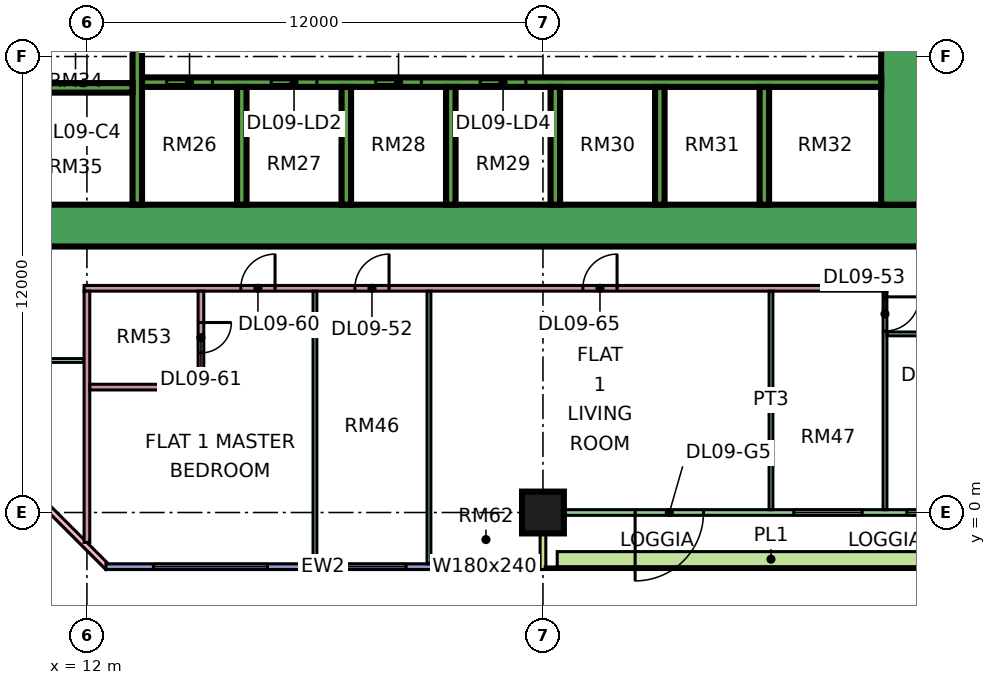
"""IFC4 building model, lengths in metres.
Left out: names, types, materials, properties, quantities, classifications, styles, units other than length and angle.
Written with IfcOpenShell. Run it as: python <this file> out.ifc"""

import sys

from ifc_helpers import new_model, si_unit, direction, frame, frame_2d, origin, origin_2d, place, context, subcontext, project, spatial, rectangle, extrude, element, fill, save


model = new_model("IFC4")
c1 = context("Model", 3, precision=1e-05, world=origin(), true_north=direction((0.0, 1.0)))
c2 = subcontext(c1, "Body", "Model", "MODEL_VIEW")
j1 = project(units=[si_unit("LENGTHUNIT", "METRE"), si_unit("PLANEANGLEUNIT", "RADIAN")], contexts=[c1])
p1 = place(None, origin())
s1 = spatial("IfcSite", under=j1, at=p1, CompositionType="ELEMENT")
p2 = place(p1, origin())
s2 = spatial("IfcBuilding", under=s1, at=p2, CompositionType="ELEMENT")
p3 = place(p2, frame((0.0, 0.0, 48.9)))
s3 = spatial("IfcBuildingStorey", under=s2, at=p3, CompositionType="ELEMENT", Elevation=48.9)
p4 = place(p3, frame((24.0, 0.0, 0.0), z_axis=(0.0, 0.0, 1.0), x_axis=(1.0, 0.0, 0.0)))
e1 = element("IfcColumn", 1, at=p4, inside=s3, PredefinedType="COLUMN", context=c2, shape_type="SweptSolid", body=[
    extrude(rectangle(XDim=1.1, YDim=1.1, at=origin_2d()), origin(), (0.0, 0.0, 1.0), 3.75),
])
p5 = place(p3, frame((9.0, 7.55, 0.0), z_axis=(0.0, 0.0, 1.0), x_axis=(1.0, 0.0, 0.0)))
e2 = element("IfcWall", 2, at=p5, inside=s3, PredefinedType="SHEAR", context=c2, shape_type="SweptSolid", body=[
    extrude(rectangle(XDim=25.0, YDim=1.1, at=frame_2d((12.5, 0.0))), origin(), (0.0, 0.0, 1.0), 3.75),
])
p6 = place(p3, frame((33.45, 8.1, 0.0), z_axis=(0.0, 0.0, 1.0), x_axis=(0.0, 1.0, 0.0)))
e3 = element("IfcWall", 3, at=p6, inside=s3, PredefinedType="SHEAR", context=c2, shape_type="SweptSolid", body=[
    extrude(rectangle(XDim=10.8, YDim=1.1, at=frame_2d((5.4, 0.0))), origin(), (0.0, 0.0, 1.0), 3.75),
])
p7 = place(p6, frame((5.1, 0.0, 0.0)))
e4 = element("IfcOpeningElement", 4, at=p7, cuts=e3, PredefinedType="OPENING", context=c2, shape_type="SweptSolid", body=[
    extrude(rectangle(XDim=1.8, YDim=2.4, at=frame_2d((0.9, 1.2))), frame((0.0, 0.56, 0.0), z_axis=(0.0, -1.0, 0.0), x_axis=(1.0, 0.0, 0.0)), (0.0, 0.0, 1.0), 1.12),
])
p8 = place(p3, frame((13.325, 8.1, 0.0), z_axis=(0.0, 0.0, 1.0), x_axis=(0.0, 1.0, 0.0)))
e5 = element("IfcWall", 5, at=p8, inside=s3, PredefinedType="SHEAR", context=c2, shape_type="SweptSolid", body=[
    extrude(rectangle(XDim=10.8, YDim=0.25, at=frame_2d((5.4, 0.0))), origin(), (0.0, 0.0, 1.0), 3.75),
])
p9 = place(p3, frame((13.45, 11.325, 0.0), z_axis=(0.0, 0.0, 1.0), x_axis=(1.0, 0.0, 0.0)))
e6 = element("IfcWall", 6, at=p9, inside=s3, PredefinedType="SHEAR", context=c2, shape_type="SweptSolid", body=[
    extrude(rectangle(XDim=19.45, YDim=0.25, at=frame_2d((9.725, 0.0))), origin(), (0.0, 0.0, 1.0), 3.75),
])
p10 = place(p9, frame((0.65, 0.0, 0.0)))
e7 = element("IfcOpeningElement", 7, at=p10, cuts=e6, PredefinedType="OPENING", context=c2, shape_type="SweptSolid", body=[
    extrude(rectangle(XDim=1.2, YDim=2.2, at=frame_2d((0.6, 1.1))), frame((0.0, 0.135, 0.0), z_axis=(0.0, -1.0, 0.0), x_axis=(1.0, 0.0, 0.0)), (0.0, 0.0, 1.0), 0.27),
])
p11 = place(p9, frame((3.4, 0.0, 0.0)))
e8 = element("IfcOpeningElement", 8, at=p11, cuts=e6, PredefinedType="OPENING", context=c2, shape_type="SweptSolid", body=[
    extrude(rectangle(XDim=1.2, YDim=2.2, at=frame_2d((0.6, 1.1))), frame((0.0, 0.135, 0.0), z_axis=(0.0, -1.0, 0.0), x_axis=(1.0, 0.0, 0.0)), (0.0, 0.0, 1.0), 0.27),
])
p12 = place(p9, frame((6.15, 0.0, 0.0)))
e9 = element("IfcOpeningElement", 9, at=p12, cuts=e6, PredefinedType="OPENING", context=c2, shape_type="SweptSolid", body=[
    extrude(rectangle(XDim=1.2, YDim=2.2, at=frame_2d((0.6, 1.1))), frame((0.0, 0.135, 0.0), z_axis=(0.0, -1.0, 0.0), x_axis=(1.0, 0.0, 0.0)), (0.0, 0.0, 1.0), 0.27),
])
p13 = place(p9, frame((8.9, 0.0, 0.0)))
e10 = element("IfcOpeningElement", 10, at=p13, cuts=e6, PredefinedType="OPENING", context=c2, shape_type="SweptSolid", body=[
    extrude(rectangle(XDim=1.2, YDim=2.2, at=frame_2d((0.6, 1.1))), frame((0.0, 0.135, 0.0), z_axis=(0.0, -1.0, 0.0), x_axis=(1.0, 0.0, 0.0)), (0.0, 0.0, 1.0), 0.27),
])
p14 = place(p3, frame((10.2, 11.175, 0.0), z_axis=(0.0, 0.0, 1.0), x_axis=(1.0, 0.0, 0.0)))
e11 = element("IfcWall", 11, at=p14, inside=s3, PredefinedType="SHEAR", context=c2, shape_type="SweptSolid", body=[
    extrude(rectangle(XDim=3.0, YDim=0.25, at=frame_2d((1.5, 0.0))), origin(), (0.0, 0.0, 1.0), 3.75),
])
for number, where, z_axis, x_axis in (
    (12, (16.075, 8.1, 0.0), (0.0, 0.0, 1.0), (0.0, 1.0, 0.0)),
    (13, (18.825, 8.1, 0.0), (0.0, 0.0, 1.0), (0.0, 1.0, 0.0)),
    (14, (21.575, 8.1, 0.0), (0.0, 0.0, 1.0), (0.0, 1.0, 0.0)),
    (15, (24.325, 8.1, 0.0), (0.0, 0.0, 1.0), (0.0, 1.0, 0.0)),
    (16, (27.075, 8.1, 0.0), (0.0, 0.0, 1.0), (0.0, 1.0, 0.0)),
    (17, (29.825, 8.1, 0.0), (0.0, 0.0, 1.0), (0.0, 1.0, 0.0)),
):
    element("IfcWall", number, at=place(p3, frame(where, z_axis=z_axis, x_axis=x_axis)), inside=s3, PredefinedType="SHEAR", context=c2, shape_type="SweptSolid", body=[
        extrude(rectangle(XDim=3.1, YDim=0.25, at=frame_2d((1.55, 0.0))), origin(), (0.0, 0.0, 1.0), 3.75),
    ])
p15 = place(p3, frame((-1.447, 12.553, 0.0), z_axis=(0.0, 0.0, 1.0), x_axis=(0.707106781187, -0.707106781187, 0.0)))
e18 = element("IfcWall", 18, at=p15, inside=s3, PredefinedType="SOLIDWALL", context=c2, shape_type="SweptSolid", body=[
    extrude(rectangle(XDim=19.799, YDim=0.15, at=frame_2d((9.899, 0.0))), origin(), (0.0, 0.0, 1.0), 3.35),
])
p16 = place(p15, frame((2.212, 0.0, 0.45)))
e19 = element("IfcOpeningElement", 19, at=p16, cuts=e18, PredefinedType="OPENING", context=c2, shape_type="SweptSolid", body=[
    extrude(rectangle(XDim=3.0, YDim=2.4, at=frame_2d((1.5, 1.2))), frame((0.0, 0.085, 0.0), z_axis=(0.0, -1.0, 0.0), x_axis=(1.0, 0.0, 0.0)), (0.0, 0.0, 1.0), 0.17),
])
p17 = place(p15, frame((10.216, 0.0, 0.45)))
e20 = element("IfcOpeningElement", 20, at=p17, cuts=e18, PredefinedType="OPENING", context=c2, shape_type="SweptSolid", body=[
    extrude(rectangle(XDim=3.0, YDim=2.4, at=frame_2d((1.5, 1.2))), frame((0.0, 0.085, 0.0), z_axis=(0.0, -1.0, 0.0), x_axis=(1.0, 0.0, 0.0)), (0.0, 0.0, 1.0), 0.17),
])
p18 = place(p3, frame((12.5, -1.425, 0.0), z_axis=(0.0, 0.0, 1.0), x_axis=(1.0, 0.0, 0.0)))
e21 = element("IfcWall", 21, at=p18, inside=s3, PredefinedType="SOLIDWALL", context=c2, shape_type="SweptSolid", body=[
    extrude(rectangle(XDim=11.425, YDim=0.15, at=frame_2d((5.712, 0.0))), origin(), (0.0, 0.0, 1.0), 3.35),
])
p19 = place(p18, frame((1.25, 0.0, 0.45)))
e22 = element("IfcOpeningElement", 22, at=p19, cuts=e21, PredefinedType="OPENING", context=c2, shape_type="SweptSolid", body=[
    extrude(rectangle(XDim=3.0, YDim=2.4, at=frame_2d((1.5, 1.2))), frame((0.0, 0.085, 0.0), z_axis=(0.0, -1.0, 0.0), x_axis=(1.0, 0.0, 0.0)), (0.0, 0.0, 1.0), 0.17),
])
p20 = place(p18, frame((6.1, 0.0, 0.45)))
e23 = element("IfcOpeningElement", 23, at=p20, cuts=e21, PredefinedType="OPENING", context=c2, shape_type="SweptSolid", body=[
    extrude(rectangle(XDim=1.8, YDim=2.4, at=frame_2d((0.9, 1.2))), frame((0.0, 0.085, 0.0), z_axis=(0.0, -1.0, 0.0), x_axis=(1.0, 0.0, 0.0)), (0.0, 0.0, 1.0), 0.17),
])
p21 = place(p18, frame((9.062, 0.0, 0.45)))
e24 = element("IfcOpeningElement", 24, at=p21, cuts=e21, PredefinedType="OPENING", context=c2, shape_type="SweptSolid", body=[
    extrude(rectangle(XDim=1.8, YDim=2.4, at=frame_2d((0.9, 1.2))), frame((0.0, 0.085, 0.0), z_axis=(0.0, -1.0, 0.0), x_axis=(1.0, 0.0, 0.0)), (0.0, 0.0, 1.0), 0.17),
])
p22 = place(p3, frame((24.075, 0.0, 0.0), z_axis=(0.0, 0.0, 1.0), x_axis=(1.0, 0.0, 0.0)))
e25 = element("IfcWall", 25, at=p22, inside=s3, PredefinedType="SOLIDWALL", context=c2, shape_type="SweptSolid", body=[
    extrude(rectangle(XDim=11.85, YDim=0.15, at=frame_2d((5.925, 0.0))), origin(), (0.0, 0.0, 1.0), 3.35),
])
p23 = place(p22, frame((2.35, 0.0, 0.0)))
e26 = element("IfcOpeningElement", 26, at=p23, cuts=e25, PredefinedType="OPENING", context=c2, shape_type="SweptSolid", body=[
    extrude(rectangle(XDim=1.8, YDim=2.4, at=frame_2d((0.9, 1.2))), frame((0.0, 0.085, 0.0), z_axis=(0.0, -1.0, 0.0), x_axis=(1.0, 0.0, 0.0)), (0.0, 0.0, 1.0), 0.17),
])
p24 = place(p22, frame((6.525, 0.0, 0.45)))
e27 = element("IfcOpeningElement", 27, at=p24, cuts=e25, PredefinedType="OPENING", context=c2, shape_type="SweptSolid", body=[
    extrude(rectangle(XDim=1.8, YDim=2.4, at=frame_2d((0.9, 1.2))), frame((0.0, 0.085, 0.0), z_axis=(0.0, -1.0, 0.0), x_axis=(1.0, 0.0, 0.0)), (0.0, 0.0, 1.0), 0.17),
])
p25 = place(p22, frame((9.5, 0.0, 0.45)))
e28 = element("IfcOpeningElement", 28, at=p25, cuts=e25, PredefinedType="OPENING", context=c2, shape_type="SweptSolid", body=[
    extrude(rectangle(XDim=1.2, YDim=2.4, at=frame_2d((0.6, 1.2))), frame((0.0, 0.085, 0.0), z_axis=(0.0, -1.0, 0.0), x_axis=(1.0, 0.0, 0.0)), (0.0, 0.0, 1.0), 0.17),
])
p26 = place(p3, frame((24.0, -1.5, 0.0), z_axis=(0.0, 0.0, 1.0), x_axis=(0.0, 1.0, 0.0)))
e29 = element("IfcWall", 29, at=p26, inside=s3, PredefinedType="SOLIDWALL", context=c2, shape_type="SweptSolid", body=[
    extrude(rectangle(XDim=1.5, YDim=0.15, at=frame_2d((0.75, 0.0))), origin(), (0.0, 0.0, 1.0), 3.35),
])
p27 = place(p3, frame((24.375, -1.229, 0.0), z_axis=(0.0, 0.0, 1.0), x_axis=(1.0, 0.0, 0.0)))
e30 = element("IfcWall", 30, at=p27, inside=s3, PredefinedType="SOLIDWALL", context=c2, shape_type="SweptSolid", body=[
    extrude(rectangle(XDim=11.25, YDim=0.4, at=frame_2d((5.625, 0.0))), origin(), (0.0, 0.0, 1.0), 0.7),
])
p28 = place(p3, frame((9.05, 4.0, 0.0), z_axis=(0.0, 0.0, 1.0), x_axis=(1.0, 0.0, 0.0)))
e31 = element("IfcWall", 31, at=p28, inside=s3, PredefinedType="PARTITIONING", context=c2, shape_type="SweptSolid", body=[
    extrude(rectangle(XDim=2.875, YDim=0.1, at=frame_2d((1.438, 0.0))), origin(), (0.0, 0.0, 1.0), 3.35),
])
p29 = place(p3, frame((11.925, 5.9, 0.0), z_axis=(0.0, 0.0, 1.0), x_axis=(1.0, 0.0, 0.0)))
e32 = element("IfcWall", 32, at=p29, inside=s3, PredefinedType="PARTITIONING", context=c2, shape_type="SweptSolid", body=[
    extrude(rectangle(XDim=21.125, YDim=0.15, at=frame_2d((10.562, 0.0))), origin(), (0.0, 0.0, 1.0), 3.35),
])
p30 = place(p29, frame((7.125, 0.0, 0.0)))
e33 = element("IfcOpeningElement", 33, at=p30, cuts=e32, PredefinedType="OPENING", context=c2, shape_type="SweptSolid", body=[
    extrude(rectangle(XDim=0.9, YDim=2.1, at=frame_2d((0.45, 1.05))), frame((0.0, 0.085, 0.0), z_axis=(0.0, -1.0, 0.0), x_axis=(1.0, 0.0, 0.0)), (0.0, 0.0, 1.0), 0.17),
])
p31 = place(p29, frame((4.125, 0.0, 0.0)))
e34 = element("IfcOpeningElement", 34, at=p31, cuts=e32, PredefinedType="OPENING", context=c2, shape_type="SweptSolid", body=[
    extrude(rectangle(XDim=0.9, YDim=2.1, at=frame_2d((0.45, 1.05))), frame((0.0, 0.085, 0.0), z_axis=(0.0, -1.0, 0.0), x_axis=(1.0, 0.0, 0.0)), (0.0, 0.0, 1.0), 0.17),
])
p32 = place(p29, frame((13.125, 0.0, 0.0)))
e35 = element("IfcOpeningElement", 35, at=p32, cuts=e32, PredefinedType="OPENING", context=c2, shape_type="SweptSolid", body=[
    extrude(rectangle(XDim=0.9, YDim=2.1, at=frame_2d((0.45, 1.05))), frame((0.0, 0.085, 0.0), z_axis=(0.0, -1.0, 0.0), x_axis=(1.0, 0.0, 0.0)), (0.0, 0.0, 1.0), 0.17),
])
p33 = place(p3, frame((12.0, -0.788, 0.0), z_axis=(0.0, 0.0, 1.0), x_axis=(0.0, 1.0, 0.0)))
e36 = element("IfcWall", 36, at=p33, inside=s3, PredefinedType="PARTITIONING", context=c2, shape_type="SweptSolid", body=[
    extrude(rectangle(XDim=6.613, YDim=0.15, at=frame_2d((3.306, 0.0))), origin(), (0.0, 0.0, 1.0), 3.35),
])
p34 = place(p3, frame((12.075, 3.3, 0.0), z_axis=(0.0, 0.0, 1.0), x_axis=(1.0, 0.0, 0.0)))
e37 = element("IfcWall", 37, at=p34, inside=s3, PredefinedType="PARTITIONING", context=c2, shape_type="SweptSolid", body=[
    extrude(rectangle(XDim=3.0, YDim=0.15, at=frame_2d((1.5, 0.0))), origin(), (0.0, 0.0, 1.0), 3.35),
])
p35 = place(p3, frame((15.0, 3.375, 0.0), z_axis=(0.0, 0.0, 1.0), x_axis=(0.0, 1.0, 0.0)))
e38 = element("IfcWall", 38, at=p35, inside=s3, PredefinedType="PARTITIONING", context=c2, shape_type="SweptSolid", body=[
    extrude(rectangle(XDim=2.45, YDim=0.15, at=frame_2d((1.225, 0.0))), origin(), (0.0, 0.0, 1.0), 3.35),
])
p36 = place(p35, frame((0.825, 0.0, 0.0)))
e39 = element("IfcOpeningElement", 39, at=p36, cuts=e38, PredefinedType="OPENING", context=c2, shape_type="SweptSolid", body=[
    extrude(rectangle(XDim=0.8, YDim=2.1, at=frame_2d((0.4, 1.05))), frame((0.0, 0.085, 0.0), z_axis=(0.0, -1.0, 0.0), x_axis=(1.0, 0.0, 0.0)), (0.0, 0.0, 1.0), 0.17),
])
p37 = place(p3, frame((18.0, -1.351, 0.0), z_axis=(0.0, 0.0, 1.0), x_axis=(0.0, 1.0, 0.0)))
e40 = element("IfcWall", 40, at=p37, inside=s3, PredefinedType="PARTITIONING", context=c2, shape_type="SweptSolid", body=[
    extrude(rectangle(XDim=7.176, YDim=0.1, at=frame_2d((3.588, 0.0))), origin(), (0.0, 0.0, 1.0), 3.35),
])
p38 = place(p3, frame((21.0, -1.35, 0.0), z_axis=(0.0, 0.0, 1.0), x_axis=(0.0, 1.0, 0.0)))
e41 = element("IfcWall", 41, at=p38, inside=s3, PredefinedType="PARTITIONING", context=c2, shape_type="SweptSolid", body=[
    extrude(rectangle(XDim=7.175, YDim=0.1, at=frame_2d((3.587, 0.0))), origin(), (0.0, 0.0, 1.0), 3.35),
])
p39 = place(p3, frame((30.0, 0.074, 0.0), z_axis=(0.0, 0.0, 1.0), x_axis=(0.0, 1.0, 0.0)))
e42 = element("IfcWall", 42, at=p39, inside=s3, PredefinedType="PARTITIONING", context=c2, shape_type="SweptSolid", body=[
    extrude(rectangle(XDim=5.751, YDim=0.1, at=frame_2d((2.875, 0.0))), origin(), (0.0, 0.0, 1.0), 3.35),
])
p40 = place(p3, frame((33.0, 0.074, 0.0), z_axis=(0.0, 0.0, 1.0), x_axis=(0.0, 1.0, 0.0)))
e43 = element("IfcWall", 43, at=p40, inside=s3, PredefinedType="PARTITIONING", context=c2, shape_type="SweptSolid", body=[
    extrude(rectangle(XDim=5.751, YDim=0.1, at=frame_2d((2.875, 0.0))), origin(), (0.0, 0.0, 1.0), 3.35),
])
p41 = place(p40, frame((4.701, 0.0, 0.0)))
e44 = element("IfcOpeningElement", 44, at=p41, cuts=e43, PredefinedType="OPENING", context=c2, shape_type="SweptSolid", body=[
    extrude(rectangle(XDim=0.9, YDim=2.1, at=frame_2d((0.45, 1.05))), frame((0.0, 0.06, 0.0), z_axis=(0.0, -1.0, 0.0), x_axis=(1.0, 0.0, 0.0)), (0.0, 0.0, 1.0), 0.12),
])
p42 = place(p3, frame((33.05, 4.7, 0.0), z_axis=(0.0, 0.0, 1.0), x_axis=(1.0, 0.0, 0.0)))
e45 = element("IfcWall", 45, at=p42, inside=s3, PredefinedType="PARTITIONING", context=c2, shape_type="SweptSolid", body=[
    extrude(rectangle(XDim=20.85, YDim=0.1, at=frame_2d((10.425, 0.0))), origin(), (0.0, 0.0, 1.0), 3.35),
])
p43 = place(p42, frame((1.0, 0.0, 0.0)))
e46 = element("IfcOpeningElement", 46, at=p43, cuts=e45, PredefinedType="OPENING", context=c2, shape_type="SweptSolid", body=[
    extrude(rectangle(XDim=0.9, YDim=2.1, at=frame_2d((0.45, 1.05))), frame((0.0, 0.06, 0.0), z_axis=(0.0, -1.0, 0.0), x_axis=(1.0, 0.0, 0.0)), (0.0, 0.0, 1.0), 0.12),
])
p44 = place(p42, frame((13.0, 0.0, 0.0)))
e47 = element("IfcOpeningElement", 47, at=p44, cuts=e45, PredefinedType="OPENING", context=c2, shape_type="SweptSolid", body=[
    extrude(rectangle(XDim=0.9, YDim=2.1, at=frame_2d((0.45, 1.05))), frame((0.0, 0.06, 0.0), z_axis=(0.0, -1.0, 0.0), x_axis=(1.0, 0.0, 0.0)), (0.0, 0.0, 1.0), 0.12),
])
p45 = place(p42, frame((16.0, 0.0, 0.0)))
e48 = element("IfcOpeningElement", 48, at=p45, cuts=e45, PredefinedType="OPENING", context=c2, shape_type="SweptSolid", body=[
    extrude(rectangle(XDim=0.9, YDim=2.1, at=frame_2d((0.45, 1.05))), frame((0.0, 0.06, 0.0), z_axis=(0.0, -1.0, 0.0), x_axis=(1.0, 0.0, 0.0)), (0.0, 0.0, 1.0), 0.12),
])
p46 = place(p42, frame((19.0, 0.0, 0.0)))
e49 = element("IfcOpeningElement", 49, at=p46, cuts=e45, PredefinedType="OPENING", context=c2, shape_type="SweptSolid", body=[
    extrude(rectangle(XDim=0.9, YDim=2.1, at=frame_2d((0.45, 1.05))), frame((0.0, 0.06, 0.0), z_axis=(0.0, -1.0, 0.0), x_axis=(1.0, 0.0, 0.0)), (0.0, 0.0, 1.0), 0.12),
])
p47 = place(p42, frame((7.0, 0.0, 0.0)))
e50 = element("IfcOpeningElement", 50, at=p47, cuts=e45, PredefinedType="OPENING", context=c2, shape_type="SweptSolid", body=[
    extrude(rectangle(XDim=0.9, YDim=2.1, at=frame_2d((0.45, 1.05))), frame((0.0, 0.06, 0.0), z_axis=(0.0, -1.0, 0.0), x_axis=(1.0, 0.0, 0.0)), (0.0, 0.0, 1.0), 0.12),
])
p48 = place(p19, origin())
e51 = element("IfcWindow", 51, at=p48, inside=s3, PartitioningType="SINGLE_PANEL", PredefinedType="WINDOW", context=c2, shape_type="SweptSolid", body=[
    extrude(rectangle(XDim=3.0, YDim=2.4, at=frame_2d((1.5, 1.2))), frame((0.0, 0.03, 0.0), z_axis=(0.0, -1.0, 0.0), x_axis=(1.0, 0.0, 0.0)), (0.0, 0.0, 1.0), 0.06),
])
fill(e22, e51)
p49 = place(p20, origin())
e52 = element("IfcWindow", 52, at=p49, inside=s3, PartitioningType="SINGLE_PANEL", PredefinedType="WINDOW", context=c2, shape_type="SweptSolid", body=[
    extrude(rectangle(XDim=1.8, YDim=2.4, at=frame_2d((0.9, 1.2))), frame((0.0, 0.03, 0.0), z_axis=(0.0, -1.0, 0.0), x_axis=(1.0, 0.0, 0.0)), (0.0, 0.0, 1.0), 0.06),
])
fill(e23, e52)
p50 = place(p21, origin())
e53 = element("IfcWindow", 53, at=p50, inside=s3, PartitioningType="SINGLE_PANEL", PredefinedType="WINDOW", context=c2, shape_type="SweptSolid", body=[
    extrude(rectangle(XDim=1.8, YDim=2.4, at=frame_2d((0.9, 1.2))), frame((0.0, 0.03, 0.0), z_axis=(0.0, -1.0, 0.0), x_axis=(1.0, 0.0, 0.0)), (0.0, 0.0, 1.0), 0.06),
])
fill(e24, e53)
p51 = place(p23, frame((1.8, 0.0, 0.0), z_axis=(0.0, 0.0, 1.0), x_axis=(-1.0, 0.0, 0.0)))
e54 = element("IfcDoor", 54, at=p51, inside=s3, OperationType="DOUBLE_DOOR_SINGLE_SWING", PredefinedType="DOOR", context=c2, shape_type="SweptSolid", body=[
    extrude(rectangle(XDim=1.8, YDim=2.4, at=frame_2d((0.9, 1.2))), frame((0.0, 0.025, 0.0), z_axis=(0.0, -1.0, 0.0), x_axis=(1.0, 0.0, 0.0)), (0.0, 0.0, 1.0), 0.05),
])
fill(e26, e54)
p52 = place(p24, origin())
e55 = element("IfcWindow", 55, at=p52, inside=s3, PartitioningType="SINGLE_PANEL", PredefinedType="WINDOW", context=c2, shape_type="SweptSolid", body=[
    extrude(rectangle(XDim=1.8, YDim=2.4, at=frame_2d((0.9, 1.2))), frame((0.0, 0.03, 0.0), z_axis=(0.0, -1.0, 0.0), x_axis=(1.0, 0.0, 0.0)), (0.0, 0.0, 1.0), 0.06),
])
fill(e27, e55)
p53 = place(p25, origin())
e56 = element("IfcWindow", 56, at=p53, inside=s3, PartitioningType="SINGLE_PANEL", PredefinedType="WINDOW", context=c2, shape_type="SweptSolid", body=[
    extrude(rectangle(XDim=1.2, YDim=2.4, at=frame_2d((0.6, 1.2))), frame((0.0, 0.03, 0.0), z_axis=(0.0, -1.0, 0.0), x_axis=(1.0, 0.0, 0.0)), (0.0, 0.0, 1.0), 0.06),
])
fill(e28, e56)
p54 = place(p10, origin())
e57 = element("IfcDoor", 57, at=p54, inside=s3, OperationType="DOUBLE_DOOR_SLIDING", PredefinedType="DOOR", context=c2, shape_type="SweptSolid", body=[
    extrude(rectangle(XDim=1.2, YDim=2.2, at=frame_2d((0.6, 1.1))), frame((0.0, 0.025, 0.0), z_axis=(0.0, -1.0, 0.0), x_axis=(1.0, 0.0, 0.0)), (0.0, 0.0, 1.0), 0.05),
])
fill(e7, e57)
p55 = place(p11, origin())
e58 = element("IfcDoor", 58, at=p55, inside=s3, OperationType="DOUBLE_DOOR_SLIDING", PredefinedType="DOOR", context=c2, shape_type="SweptSolid", body=[
    extrude(rectangle(XDim=1.2, YDim=2.2, at=frame_2d((0.6, 1.1))), frame((0.0, 0.025, 0.0), z_axis=(0.0, -1.0, 0.0), x_axis=(1.0, 0.0, 0.0)), (0.0, 0.0, 1.0), 0.05),
])
fill(e8, e58)
p56 = place(p12, origin())
e59 = element("IfcDoor", 59, at=p56, inside=s3, OperationType="DOUBLE_DOOR_SLIDING", PredefinedType="DOOR", context=c2, shape_type="SweptSolid", body=[
    extrude(rectangle(XDim=1.2, YDim=2.2, at=frame_2d((0.6, 1.1))), frame((0.0, 0.025, 0.0), z_axis=(0.0, -1.0, 0.0), x_axis=(1.0, 0.0, 0.0)), (0.0, 0.0, 1.0), 0.05),
])
fill(e9, e59)
p57 = place(p13, origin())
e60 = element("IfcDoor", 60, at=p57, inside=s3, OperationType="DOUBLE_DOOR_SLIDING", PredefinedType="DOOR", context=c2, shape_type="SweptSolid", body=[
    extrude(rectangle(XDim=1.2, YDim=2.2, at=frame_2d((0.6, 1.1))), frame((0.0, 0.025, 0.0), z_axis=(0.0, -1.0, 0.0), x_axis=(1.0, 0.0, 0.0)), (0.0, 0.0, 1.0), 0.05),
])
fill(e10, e60)
p58 = place(p30, frame((0.9, 0.0, 0.0), z_axis=(0.0, 0.0, 1.0), x_axis=(-1.0, 0.0, 0.0)))
e61 = element("IfcDoor", 61, at=p58, inside=s3, OperationType="SINGLE_SWING_RIGHT", PredefinedType="DOOR", context=c2, shape_type="SweptSolid", body=[
    extrude(rectangle(XDim=0.9, YDim=2.1, at=frame_2d((0.45, 1.05))), frame((0.0, 0.025, 0.0), z_axis=(0.0, -1.0, 0.0), x_axis=(1.0, 0.0, 0.0)), (0.0, 0.0, 1.0), 0.05),
])
fill(e33, e61)
p59 = place(p41, origin())
e62 = element("IfcDoor", 62, at=p59, inside=s3, OperationType="SINGLE_SWING_RIGHT", PredefinedType="DOOR", context=c2, shape_type="SweptSolid", body=[
    extrude(rectangle(XDim=0.9, YDim=2.1, at=frame_2d((0.45, 1.05))), frame((0.0, 0.025, 0.0), z_axis=(0.0, -1.0, 0.0), x_axis=(1.0, 0.0, 0.0)), (0.0, 0.0, 1.0), 0.05),
])
fill(e44, e62)
p60 = place(p31, frame((0.9, 0.0, 0.0), z_axis=(0.0, 0.0, 1.0), x_axis=(-1.0, 0.0, 0.0)))
e63 = element("IfcDoor", 63, at=p60, inside=s3, OperationType="SINGLE_SWING_RIGHT", PredefinedType="DOOR", context=c2, shape_type="SweptSolid", body=[
    extrude(rectangle(XDim=0.9, YDim=2.1, at=frame_2d((0.45, 1.05))), frame((0.0, 0.025, 0.0), z_axis=(0.0, -1.0, 0.0), x_axis=(1.0, 0.0, 0.0)), (0.0, 0.0, 1.0), 0.05),
])
fill(e34, e63)
p61 = place(p36, origin())
e64 = element("IfcDoor", 64, at=p61, inside=s3, OperationType="SINGLE_SWING_RIGHT", PredefinedType="DOOR", context=c2, shape_type="SweptSolid", body=[
    extrude(rectangle(XDim=0.8, YDim=2.1, at=frame_2d((0.4, 1.05))), frame((0.0, 0.025, 0.0), z_axis=(0.0, -1.0, 0.0), x_axis=(1.0, 0.0, 0.0)), (0.0, 0.0, 1.0), 0.05),
])
fill(e39, e64)
p62 = place(p32, frame((0.9, 0.0, 0.0), z_axis=(0.0, 0.0, 1.0), x_axis=(-1.0, 0.0, 0.0)))
e65 = element("IfcDoor", 65, at=p62, inside=s3, OperationType="SINGLE_SWING_RIGHT", PredefinedType="DOOR", context=c2, shape_type="SweptSolid", body=[
    extrude(rectangle(XDim=0.9, YDim=2.1, at=frame_2d((0.45, 1.05))), frame((0.0, 0.025, 0.0), z_axis=(0.0, -1.0, 0.0), x_axis=(1.0, 0.0, 0.0)), (0.0, 0.0, 1.0), 0.05),
])
fill(e35, e65)
save(model, sys.argv[1])
